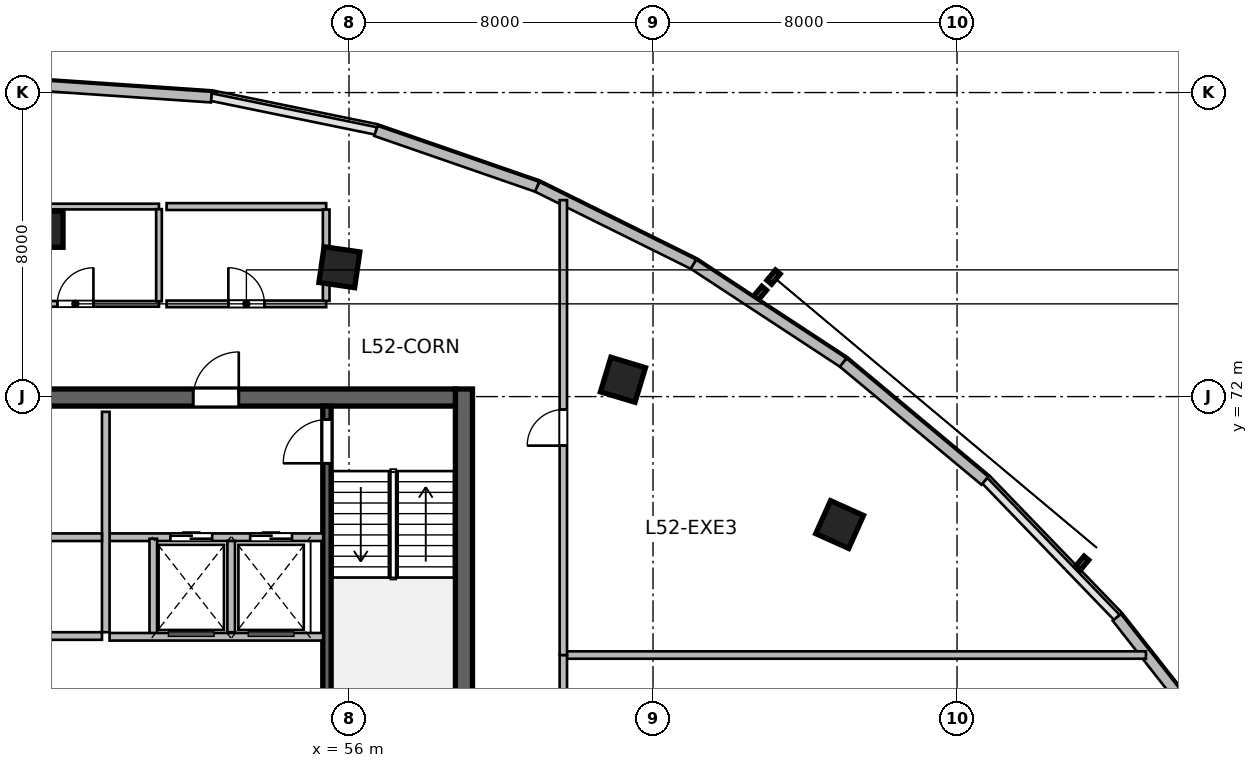
"""IFC4 building model, lengths in metres.
Left out: names, types, materials, properties, quantities, classifications, styles, units other than length and angle.
Written with IfcOpenShell. Run it as: python <this file> out.ifc"""

import sys

from ifc_helpers import new_model, si_unit, direction, frame, frame_2d, origin, origin_2d, place, context, subcontext, project, spatial, rectangle, extrude, source, transform, mapped, element, fill, save


model = new_model("IFC4")
c1 = context("Model", 3, precision=1e-05, world=origin(), true_north=direction((0.0, 1.0)))
c2 = subcontext(c1, "Body", "Model", "MODEL_VIEW")
j1 = project(units=[si_unit("LENGTHUNIT", "METRE"), si_unit("PLANEANGLEUNIT", "RADIAN")], contexts=[c1])
p1 = place(None, origin())
s1 = spatial("IfcSite", under=j1, at=p1, CompositionType="ELEMENT")
p2 = place(p1, origin())
s2 = spatial("IfcBuilding", under=s1, at=p2, CompositionType="ELEMENT")
p3 = place(p2, frame((0.0, 0.0, 215.7)))
s3 = spatial("IfcBuildingStorey", under=s2, at=p3, CompositionType="ELEMENT", Elevation=215.7)
m1 = source(origin(), c2, "Body", "SweptSolid", [
    extrude(rectangle(XDim=12.0, YDim=0.45, at=frame_2d((6.0, 0.0))), origin(), (0.0, 0.0, 1.0), 3.9),
])
p4 = place(p3, frame((59.025, 60.2, 0.0), z_axis=(0.0, 0.0, 1.0), x_axis=(0.0, 1.0, 0.0)))
e1 = element("IfcWall", 1, at=p4, inside=s3, PredefinedType="SHEAR", context=c2, shape_type="MappedRepresentation", body=[
    mapped(m1, transform((0.0, 0.0, 0.0), scale=1.0)),
])
m2 = source(origin(), c2, "Body", "SweptSolid", [
    extrude(rectangle(XDim=21.6, YDim=0.45, at=frame_2d((10.8, 0.0))), origin(), (0.0, 0.0, 1.0), 3.9),
])
p5 = place(p3, frame((37.2, 71.975, 0.0), z_axis=(0.0, 0.0, 1.0), x_axis=(1.0, 0.0, 0.0)))
e2 = element("IfcWall", 2, at=p5, inside=s3, PredefinedType="SHEAR", context=c2, shape_type="MappedRepresentation", body=[
    mapped(m2, transform((0.0, 0.0, 0.0), scale=1.0)),
])
p6 = place(p5, frame((1.2, 0.0, 0.0)))
e3 = element("IfcOpeningElement", 3, at=p6, cuts=e2, PredefinedType="OPENING", context=c2, shape_type="SweptSolid", body=[
    extrude(rectangle(XDim=0.9, YDim=2.1, at=frame_2d((0.45, 1.05))), frame((0.0, 0.235, 0.0), z_axis=(0.0, -1.0, 0.0), x_axis=(1.0, 0.0, 0.0)), (0.0, 0.0, 1.0), 0.47),
])
p7 = place(p5, frame((14.7, 0.0, 0.0)))
e4 = element("IfcOpeningElement", 4, at=p7, cuts=e2, PredefinedType="OPENING", context=c2, shape_type="SweptSolid", body=[
    extrude(rectangle(XDim=1.2, YDim=2.15, at=frame_2d((0.6, 1.075))), frame((0.0, 0.235, 0.0), z_axis=(0.0, -1.0, 0.0), x_axis=(1.0, 0.0, 0.0)), (0.0, 0.0, 1.0), 0.47),
])
p8 = place(p5, frame((4.15, 0.0, 0.0)))
e5 = element("IfcOpeningElement", 5, at=p8, cuts=e2, PredefinedType="OPENING", context=c2, shape_type="SweptSolid", body=[
    extrude(rectangle(XDim=1.3, YDim=2.15, at=frame_2d((0.65, 1.075))), frame((0.0, 0.235, 0.0), z_axis=(0.0, -1.0, 0.0), x_axis=(1.0, 0.0, 0.0)), (0.0, 0.0, 1.0), 0.47),
])
p9 = place(p5, frame((7.25, 0.0, 0.0)))
e6 = element("IfcOpeningElement", 6, at=p9, cuts=e2, PredefinedType="OPENING", context=c2, shape_type="SweptSolid", body=[
    extrude(rectangle(XDim=0.9, YDim=2.1, at=frame_2d((0.45, 1.05))), frame((0.0, 0.235, 0.0), z_axis=(0.0, -1.0, 0.0), x_axis=(1.0, 0.0, 0.0)), (0.0, 0.0, 1.0), 0.47),
])
m3 = source(origin(), c2, "Body", "SweptSolid", [
    extrude(rectangle(XDim=11.1, YDim=0.22, at=frame_2d((5.55, 0.0))), origin(), (0.0, 0.0, 1.0), 3.9),
])
p10 = place(p3, frame((55.42, 60.65, 0.0), z_axis=(0.0, 0.0, 1.0), x_axis=(0.0, 1.0, 0.0)))
e7 = element("IfcWall", 7, at=p10, inside=s3, PredefinedType="SHEAR", context=c2, shape_type="MappedRepresentation", body=[
    mapped(m3, transform((0.0, 0.0, 0.0), scale=1.0)),
])
p11 = place(p10, frame((9.595, 0.0, 0.0)))
e8 = element("IfcOpeningElement", 8, at=p11, cuts=e7, PredefinedType="OPENING", context=c2, shape_type="SweptSolid", body=[
    extrude(rectangle(XDim=1.15, YDim=2.15, at=frame_2d((0.575, 1.075))), frame((0.0, 0.12, 0.0), z_axis=(0.0, -1.0, 0.0), x_axis=(1.0, 0.0, 0.0)), (0.0, 0.0, 1.0), 0.24),
])
m4 = source(origin(), c2, "Body", "SweptSolid", [
    extrude(rectangle(XDim=0.95, YDim=0.95, at=origin_2d()), origin(), (0.0, 0.0, 1.0), 3.9),
])
for number, where, z_axis, x_axis in (
    (9, (48.0, 76.404, 0.0), (0.0, 0.0, 1.0), (0.0, 1.0, 0.0)),
    (10, (55.747, 75.404, 0.0), (0.0, 0.0, 1.0), (0.143, 0.99, 0.0)),
    (11, (63.209, 72.442, 0.0), (0.0, 0.0, 1.0), (0.289, 0.957, 0.0)),
    (12, (68.91, 68.633, 0.0), (0.0, 0.0, 1.0), (0.409, 0.912, 0.0)),
):
    element("IfcColumn", number, at=place(p3, frame(where, z_axis=z_axis, x_axis=x_axis)), inside=s3, PredefinedType="COLUMN", context=c2, shape_type="MappedRepresentation", body=[
        mapped(m4, transform((0.0, 0.0, 0.0), scale=1.0)),
    ])
m5 = source(origin(), c2, "Body", "SweptSolid", [
    extrude(rectangle(XDim=4.387, YDim=0.28, at=frame_2d((2.193, 0.0))), origin(), (0.0, 0.0, 1.0), 3.64),
])
p12 = place(p3, frame((48.0, 80.177, 0.0), z_axis=(0.0, 0.0, 1.0), x_axis=(0.997703650546, -0.06773053733, 0.0)))
e13 = element("IfcWall", 13, at=p12, inside=s3, PredefinedType="SOLIDWALL", context=c2, shape_type="MappedRepresentation", body=[
    mapped(m5, transform((0.0, 0.0, 0.0), scale=1.0)),
])
m6 = source(origin(), c2, "Body", "SweptSolid", [
    extrude(rectangle(XDim=4.492, YDim=0.28, at=frame_2d((2.246, 0.0))), origin(), (0.0, 0.0, 1.0), 3.64),
])
p13 = place(p3, frame((56.709, 78.991, 0.0), z_axis=(0.0, 0.0, 1.0), x_axis=(0.944872297412, -0.32743906545, 0.0)))
e14 = element("IfcWall", 14, at=p13, inside=s3, PredefinedType="SOLIDWALL", context=c2, shape_type="MappedRepresentation", body=[
    mapped(m6, transform((0.0, 0.0, 0.0), scale=1.0)),
])
m7 = source(origin(), c2, "Body", "SweptSolid", [
    extrude(rectangle(XDim=4.59, YDim=0.28, at=frame_2d((2.295, 0.0))), origin(), (0.0, 0.0, 1.0), 3.64),
])
p14 = place(p3, frame((60.954, 77.52, 0.0), z_axis=(0.0, 0.0, 1.0), x_axis=(0.895974834987, -0.444104824418, 0.0)))
e15 = element("IfcWall", 15, at=p14, inside=s3, PredefinedType="SOLIDWALL", context=c2, shape_type="MappedRepresentation", body=[
    mapped(m7, transform((0.0, 0.0, 0.0), scale=1.0)),
])
m8 = source(origin(), c2, "Body", "SweptSolid", [
    extrude(rectangle(XDim=4.713, YDim=0.28, at=frame_2d((2.356, 0.0))), origin(), (0.0, 0.0, 1.0), 3.64),
])
p15 = place(p3, frame((65.066, 75.482, 0.0), z_axis=(0.0, 0.0, 1.0), x_axis=(0.835974386457, -0.548768462275, 0.0)))
e16 = element("IfcWall", 16, at=p15, inside=s3, PredefinedType="SOLIDWALL", context=c2, shape_type="MappedRepresentation", body=[
    mapped(m8, transform((0.0, 0.0, 0.0), scale=1.0)),
])
m9 = source(origin(), c2, "Body", "SweptSolid", [
    extrude(rectangle(XDim=4.852, YDim=0.28, at=frame_2d((2.426, 0.0))), origin(), (0.0, 0.0, 1.0), 3.64),
])
p16 = place(p3, frame((69.006, 72.896, 0.0), z_axis=(0.0, 0.0, 1.0), x_axis=(0.767936605821, -0.640525853843, 0.0)))
e17 = element("IfcWall", 17, at=p16, inside=s3, PredefinedType="SOLIDWALL", context=c2, shape_type="MappedRepresentation", body=[
    mapped(m9, transform((0.0, 0.0, 0.0), scale=1.0)),
])
m10 = source(origin(), c2, "Body", "SweptSolid", [
    extrude(rectangle(XDim=5.153, YDim=0.28, at=frame_2d((2.577, 0.0))), origin(), (0.0, 0.0, 1.0), 3.64),
])
p17 = place(p3, frame((76.205, 66.19, 0.0), z_axis=(0.0, 0.0, 1.0), x_axis=(0.618179283891, -0.786037132054, 0.0)))
e18 = element("IfcWall", 18, at=p17, inside=s3, PredefinedType="SOLIDWALL", context=c2, shape_type="MappedRepresentation", body=[
    mapped(m10, transform((0.0, 0.0, 0.0), scale=1.0)),
])
m11 = source(origin(), c2, "Body", "SweptSolid", [
    extrude(rectangle(XDim=5.62, YDim=0.2, at=frame_2d((2.81, 0.0))), origin(), (0.0, 0.0, 1.0), 3.64),
])
p18 = place(p3, frame((49.7, 68.3, 0.0), z_axis=(0.0, 0.0, 1.0), x_axis=(1.0, 0.0, 0.0)))
e19 = element("IfcWall", 19, at=p18, inside=s3, PredefinedType="SOLIDWALL", context=c2, shape_type="MappedRepresentation", body=[
    mapped(m11, transform((0.0, 0.0, 0.0), scale=1.0)),
])
p19 = place(p18, frame((1.6, 0.0, 0.0)))
e20 = element("IfcOpeningElement", 20, at=p19, cuts=e19, PredefinedType="OPENING", context=c2, shape_type="SweptSolid", body=[
    extrude(rectangle(XDim=1.1, YDim=2.15, at=frame_2d((0.55, 1.075))), frame((0.0, 0.11, 0.0), z_axis=(0.0, -1.0, 0.0), x_axis=(1.0, 0.0, 0.0)), (0.0, 0.0, 1.0), 0.22),
])
p20 = place(p18, frame((3.7, 0.0, 0.0)))
e21 = element("IfcOpeningElement", 21, at=p20, cuts=e19, PredefinedType="OPENING", context=c2, shape_type="SweptSolid", body=[
    extrude(rectangle(XDim=1.1, YDim=2.15, at=frame_2d((0.55, 1.075))), frame((0.0, 0.11, 0.0), z_axis=(0.0, -1.0, 0.0), x_axis=(1.0, 0.0, 0.0)), (0.0, 0.0, 1.0), 0.22),
])
m12 = source(origin(), c2, "Body", "SweptSolid", [
    extrude(rectangle(XDim=5.8, YDim=0.2, at=frame_2d((2.9, 0.0))), origin(), (0.0, 0.0, 1.0), 3.64),
])
p21 = place(p3, frame((49.6, 65.8, 0.0), z_axis=(0.0, 0.0, 1.0), x_axis=(0.0, 1.0, 0.0)))
e22 = element("IfcWall", 22, at=p21, inside=s3, PredefinedType="SOLIDWALL", context=c2, shape_type="MappedRepresentation", body=[
    mapped(m12, transform((0.0, 0.0, 0.0), scale=1.0)),
])
m13 = source(origin(), c2, "Body", "SweptSolid", [
    extrude(rectangle(XDim=2.58, YDim=0.2, at=frame_2d((1.29, 0.0))), origin(), (0.0, 0.0, 1.0), 3.64),
])
p22 = place(p3, frame((50.85, 65.68, 0.0), z_axis=(0.0, 0.0, 1.0), x_axis=(0.0, 1.0, 0.0)))
e23 = element("IfcWall", 23, at=p22, inside=s3, PredefinedType="SOLIDWALL", context=c2, shape_type="MappedRepresentation", body=[
    mapped(m13, transform((0.0, 0.0, 0.0), scale=1.0)),
])
m14 = source(origin(), c2, "Body", "SweptSolid", [
    extrude(rectangle(XDim=2.4, YDim=0.2, at=frame_2d((1.2, 0.0))), origin(), (0.0, 0.0, 1.0), 3.64),
])
p23 = place(p3, frame((52.9, 65.8, 0.0), z_axis=(0.0, 0.0, 1.0), x_axis=(0.0, 1.0, 0.0)))
e24 = element("IfcWall", 24, at=p23, inside=s3, PredefinedType="SOLIDWALL", context=c2, shape_type="MappedRepresentation", body=[
    mapped(m14, transform((0.0, 0.0, 0.0), scale=1.0)),
])
p24 = place(p3, frame((49.7, 65.68, 0.0), z_axis=(0.0, 0.0, 1.0), x_axis=(1.0, 0.0, 0.0)))
e25 = element("IfcWall", 25, at=p24, inside=s3, PredefinedType="SOLIDWALL", context=c2, shape_type="MappedRepresentation", body=[
    mapped(m11, transform((0.0, 0.0, 0.0), scale=1.0)),
])
m15 = source(origin(), c2, "Body", "SweptSolid", [
    extrude(rectangle(XDim=8.8, YDim=0.2, at=frame_2d((4.4, 0.0))), origin(), (0.0, 0.0, 1.0), 3.64),
])
p25 = place(p3, frame((40.7, 68.3, 0.0), z_axis=(0.0, 0.0, 1.0), x_axis=(1.0, 0.0, 0.0)))
e26 = element("IfcWall", 26, at=p25, inside=s3, PredefinedType="SOLIDWALL", context=c2, shape_type="MappedRepresentation", body=[
    mapped(m15, transform((0.0, 0.0, 0.0), scale=1.0)),
])
p26 = place(p3, frame((40.7, 65.7, 0.0), z_axis=(0.0, 0.0, 1.0), x_axis=(1.0, 0.0, 0.0)))
e27 = element("IfcWall", 27, at=p26, inside=s3, PredefinedType="SOLIDWALL", context=c2, shape_type="MappedRepresentation", body=[
    mapped(m15, transform((0.0, 0.0, 0.0), scale=1.0)),
])
p27 = place(p26, frame((1.6, 0.0, 0.0)))
e28 = element("IfcOpeningElement", 28, at=p27, cuts=e27, PredefinedType="OPENING", context=c2, shape_type="SweptSolid", body=[
    extrude(rectangle(XDim=0.9, YDim=2.1, at=frame_2d((0.45, 1.05))), frame((0.0, 0.11, 0.0), z_axis=(0.0, -1.0, 0.0), x_axis=(1.0, 0.0, 0.0)), (0.0, 0.0, 1.0), 0.22),
])
p28 = place(p26, frame((6.1, 0.0, 0.0)))
e29 = element("IfcOpeningElement", 29, at=p28, cuts=e27, PredefinedType="OPENING", context=c2, shape_type="SweptSolid", body=[
    extrude(rectangle(XDim=0.9, YDim=2.1, at=frame_2d((0.45, 1.05))), frame((0.0, 0.11, 0.0), z_axis=(0.0, -1.0, 0.0), x_axis=(1.0, 0.0, 0.0)), (0.0, 0.0, 1.0), 0.22),
])
m16 = source(origin(), c2, "Body", "SweptSolid", [
    extrude(rectangle(XDim=4.4, YDim=0.15, at=frame_2d((2.2, 0.0))), origin(), (0.0, 0.0, 1.0), 3.64),
])
p29 = place(p3, frame((46.6, 74.44, 0.0), z_axis=(0.0, 0.0, 1.0), x_axis=(1.0, 0.0, 0.0)))
e30 = element("IfcWall", 30, at=p29, inside=s3, PredefinedType="PARTITIONING", context=c2, shape_type="MappedRepresentation", body=[
    mapped(m16, transform((0.0, 0.0, 0.0), scale=1.0)),
])
p30 = place(p29, frame((1.725, 0.0, 0.0)))
e31 = element("IfcOpeningElement", 31, at=p30, cuts=e30, PredefinedType="OPENING", context=c2, shape_type="SweptSolid", body=[
    extrude(rectangle(XDim=0.95, YDim=2.1, at=frame_2d((0.475, 1.05))), frame((0.0, 0.085, 0.0), z_axis=(0.0, -1.0, 0.0), x_axis=(1.0, 0.0, 0.0)), (0.0, 0.0, 1.0), 0.17),
])
p31 = place(p3, frame((46.6, 77.0, 0.0), z_axis=(0.0, 0.0, 1.0), x_axis=(1.0, 0.0, 0.0)))
e32 = element("IfcWall", 32, at=p31, inside=s3, PredefinedType="PARTITIONING", context=c2, shape_type="MappedRepresentation", body=[
    mapped(m16, transform((0.0, 0.0, 0.0), scale=1.0)),
])
m17 = source(origin(), c2, "Body", "SweptSolid", [
    extrude(rectangle(XDim=2.425, YDim=0.15, at=frame_2d((1.212, 0.0))), origin(), (0.0, 0.0, 1.0), 3.64),
])
p32 = place(p3, frame((51.0, 74.508, 0.0), z_axis=(0.0, 0.0, 1.0), x_axis=(0.0, 1.0, 0.0)))
e33 = element("IfcWall", 33, at=p32, inside=s3, PredefinedType="PARTITIONING", context=c2, shape_type="MappedRepresentation", body=[
    mapped(m17, transform((0.0, 0.0, 0.0), scale=1.0)),
])
m18 = source(origin(), c2, "Body", "SweptSolid", [
    extrude(rectangle(XDim=4.2, YDim=0.175, at=frame_2d((2.1, 0.0))), origin(), (0.0, 0.0, 1.0), 3.64),
])
p33 = place(p3, frame((51.2, 74.44, 0.0), z_axis=(0.0, 0.0, 1.0), x_axis=(1.0, 0.0, 0.0)))
e34 = element("IfcWall", 34, at=p33, inside=s3, PredefinedType="PARTITIONING", context=c2, shape_type="MappedRepresentation", body=[
    mapped(m18, transform((0.0, 0.0, 0.0), scale=1.0)),
])
p34 = place(p33, frame((1.625, 0.0, 0.0)))
e35 = element("IfcOpeningElement", 35, at=p34, cuts=e34, PredefinedType="OPENING", context=c2, shape_type="SweptSolid", body=[
    extrude(rectangle(XDim=0.95, YDim=2.12, at=frame_2d((0.475, 1.06))), frame((0.0, 0.098, 0.0), z_axis=(0.0, -1.0, 0.0), x_axis=(1.0, 0.0, 0.0)), (0.0, 0.0, 1.0), 0.195),
])
m19 = source(origin(), c2, "Body", "SweptSolid", [
    extrude(rectangle(XDim=4.2, YDim=0.18, at=frame_2d((2.1, 0.0))), origin(), (0.0, 0.0, 1.0), 3.64),
])
p35 = place(p3, frame((51.2, 77.0, 0.0), z_axis=(0.0, 0.0, 1.0), x_axis=(1.0, 0.0, 0.0)))
e36 = element("IfcWall", 36, at=p35, inside=s3, PredefinedType="PLUMBINGWALL", context=c2, shape_type="MappedRepresentation", body=[
    mapped(m19, transform((0.0, 0.0, 0.0), scale=1.0)),
])
m20 = source(origin(), c2, "Body", "SweptSolid", [
    extrude(rectangle(XDim=2.403, YDim=0.175, at=frame_2d((1.201, 0.0))), origin(), (0.0, 0.0, 1.0), 3.64),
])
p36 = place(p3, frame((55.4, 74.519, 0.0), z_axis=(0.0, 0.0, 1.0), x_axis=(0.0, 1.0, 0.0)))
e37 = element("IfcWall", 37, at=p36, inside=s3, PredefinedType="PARTITIONING", context=c2, shape_type="MappedRepresentation", body=[
    mapped(m20, transform((0.0, 0.0, 0.0), scale=1.0)),
])
m21 = source(origin(), c2, "Body", "SweptSolid", [
    extrude(rectangle(XDim=15.332, YDim=0.195, at=frame_2d((7.666, 0.0))), origin(), (0.0, 0.0, 1.0), 3.64),
])
p37 = place(p3, frame((61.64, 65.2, 0.0), z_axis=(0.0, 0.0, 1.0), x_axis=(1.0, 0.0, 0.0)))
e38 = element("IfcWall", 38, at=p37, inside=s3, PredefinedType="PARTITIONING", context=c2, shape_type="MappedRepresentation", body=[
    mapped(m21, transform((0.0, 0.0, 0.0), scale=1.0)),
])
m22 = source(origin(), c2, "Body", "SweptSolid", [
    extrude(rectangle(XDim=4.0, YDim=0.195, at=frame_2d((2.0, 0.0))), origin(), (0.0, 0.0, 1.0), 3.64),
])
p38 = place(p3, frame((61.64, 61.2, 0.0), z_axis=(0.0, 0.0, 1.0), x_axis=(0.0, 1.0, 0.0)))
e39 = element("IfcWall", 39, at=p38, inside=s3, PredefinedType="PARTITIONING", context=c2, shape_type="MappedRepresentation", body=[
    mapped(m22, transform((0.0, 0.0, 0.0), scale=1.0)),
])
p39 = place(p38, frame((1.045, 0.0, 0.0)))
e40 = element("IfcOpeningElement", 40, at=p39, cuts=e39, PredefinedType="OPENING", context=c2, shape_type="SweptSolid", body=[
    extrude(rectangle(XDim=0.95, YDim=2.1, at=frame_2d((0.475, 1.05))), frame((0.0, 0.107, 0.0), z_axis=(0.0, -1.0, 0.0), x_axis=(1.0, 0.0, 0.0)), (0.0, 0.0, 1.0), 0.215),
])
m23 = source(origin(), c2, "Body", "SweptSolid", [
    extrude(rectangle(XDim=11.969, YDim=0.195, at=frame_2d((5.984, 0.0))), origin(), (0.0, 0.0, 1.0), 3.64),
])
p40 = place(p3, frame((61.64, 65.2, 0.0), z_axis=(0.0, 0.0, 1.0), x_axis=(0.0, 1.0, 0.0)))
e41 = element("IfcWall", 41, at=p40, inside=s3, PredefinedType="PARTITIONING", context=c2, shape_type="MappedRepresentation", body=[
    mapped(m23, transform((0.0, 0.0, 0.0), scale=1.0)),
])
p41 = place(p40, frame((5.51, 0.0, 0.0)))
e42 = element("IfcOpeningElement", 42, at=p41, cuts=e41, PredefinedType="OPENING", context=c2, shape_type="SweptSolid", body=[
    extrude(rectangle(XDim=0.95, YDim=2.1, at=frame_2d((0.475, 1.05))), frame((0.0, 0.107, 0.0), z_axis=(0.0, -1.0, 0.0), x_axis=(1.0, 0.0, 0.0)), (0.0, 0.0, 1.0), 0.215),
])
m24 = source(origin(), c2, "Body", "SweptSolid", [
    extrude(rectangle(XDim=1.15, YDim=2.15, at=frame_2d((0.575, 1.075))), frame((0.0, 0.025, 0.0), z_axis=(0.0, -1.0, 0.0), x_axis=(1.0, 0.0, 0.0)), (0.0, 0.0, 1.0), 0.05),
])
p42 = place(p11, origin())
e43 = element("IfcDoor", 43, at=p42, inside=s3, OperationType="SINGLE_SWING_LEFT", PredefinedType="DOOR", context=c2, shape_type="MappedRepresentation", body=[
    mapped(m24, transform((0.0, 0.0, 0.0), scale=1.0)),
])
fill(e8, e43)
m25 = source(origin(), c2, "Body", "SweptSolid", [
    extrude(rectangle(XDim=1.2, YDim=2.15, at=frame_2d((0.6, 1.075))), frame((0.0, 0.025, 0.0), z_axis=(0.0, -1.0, 0.0), x_axis=(1.0, 0.0, 0.0)), (0.0, 0.0, 1.0), 0.05),
])
p43 = place(p7, origin())
e44 = element("IfcDoor", 44, at=p43, inside=s3, OperationType="SINGLE_SWING_RIGHT", PredefinedType="DOOR", context=c2, shape_type="MappedRepresentation", body=[
    mapped(m25, transform((0.0, 0.0, 0.0), scale=1.0)),
])
fill(e4, e44)
m26 = source(origin(), c2, "Body", "SweptSolid", [
    extrude(rectangle(XDim=1.1, YDim=2.15, at=frame_2d((0.55, 1.075))), frame((0.0, 0.025, 0.0), z_axis=(0.0, -1.0, 0.0), x_axis=(1.0, 0.0, 0.0)), (0.0, 0.0, 1.0), 0.05),
])
p44 = place(p19, origin())
e45 = element("IfcDoor", 45, at=p44, inside=s3, OperationType="DOUBLE_DOOR_SLIDING", PredefinedType="DOOR", context=c2, shape_type="MappedRepresentation", body=[
    mapped(m26, transform((0.0, 0.0, 0.0), scale=1.0)),
])
fill(e20, e45)
p45 = place(p20, origin())
e46 = element("IfcDoor", 46, at=p45, inside=s3, OperationType="DOUBLE_DOOR_SLIDING", PredefinedType="DOOR", context=c2, shape_type="MappedRepresentation", body=[
    mapped(m26, transform((0.0, 0.0, 0.0), scale=1.0)),
])
fill(e21, e46)
m27 = source(origin(), c2, "Body", "SweptSolid", [
    extrude(rectangle(XDim=0.95, YDim=2.1, at=frame_2d((0.475, 1.05))), frame((0.0, 0.025, 0.0), z_axis=(0.0, -1.0, 0.0), x_axis=(1.0, 0.0, 0.0)), (0.0, 0.0, 1.0), 0.05),
])
p46 = place(p30, origin())
e47 = element("IfcDoor", 47, at=p46, inside=s3, OperationType="SINGLE_SWING_RIGHT", PredefinedType="DOOR", context=c2, shape_type="MappedRepresentation", body=[
    mapped(m27, transform((0.0, 0.0, 0.0), scale=1.0)),
])
fill(e31, e47)
m28 = source(origin(), c2, "Body", "SweptSolid", [
    extrude(rectangle(XDim=0.95, YDim=2.12, at=frame_2d((0.475, 1.06))), frame((0.0, 0.025, 0.0), z_axis=(0.0, -1.0, 0.0), x_axis=(1.0, 0.0, 0.0)), (0.0, 0.0, 1.0), 0.05),
])
p47 = place(p34, origin())
e48 = element("IfcDoor", 48, at=p47, inside=s3, OperationType="SINGLE_SWING_LEFT", PredefinedType="DOOR", context=c2, shape_type="MappedRepresentation", body=[
    mapped(m28, transform((0.0, 0.0, 0.0), scale=1.0)),
])
fill(e35, e48)
p48 = place(p41, origin())
e49 = element("IfcDoor", 49, at=p48, inside=s3, OperationType="SINGLE_SWING_LEFT", PredefinedType="DOOR", context=c2, shape_type="MappedRepresentation", body=[
    mapped(m27, transform((0.0, 0.0, 0.0), scale=1.0)),
])
fill(e42, e49)
save(model, sys.argv[1])
